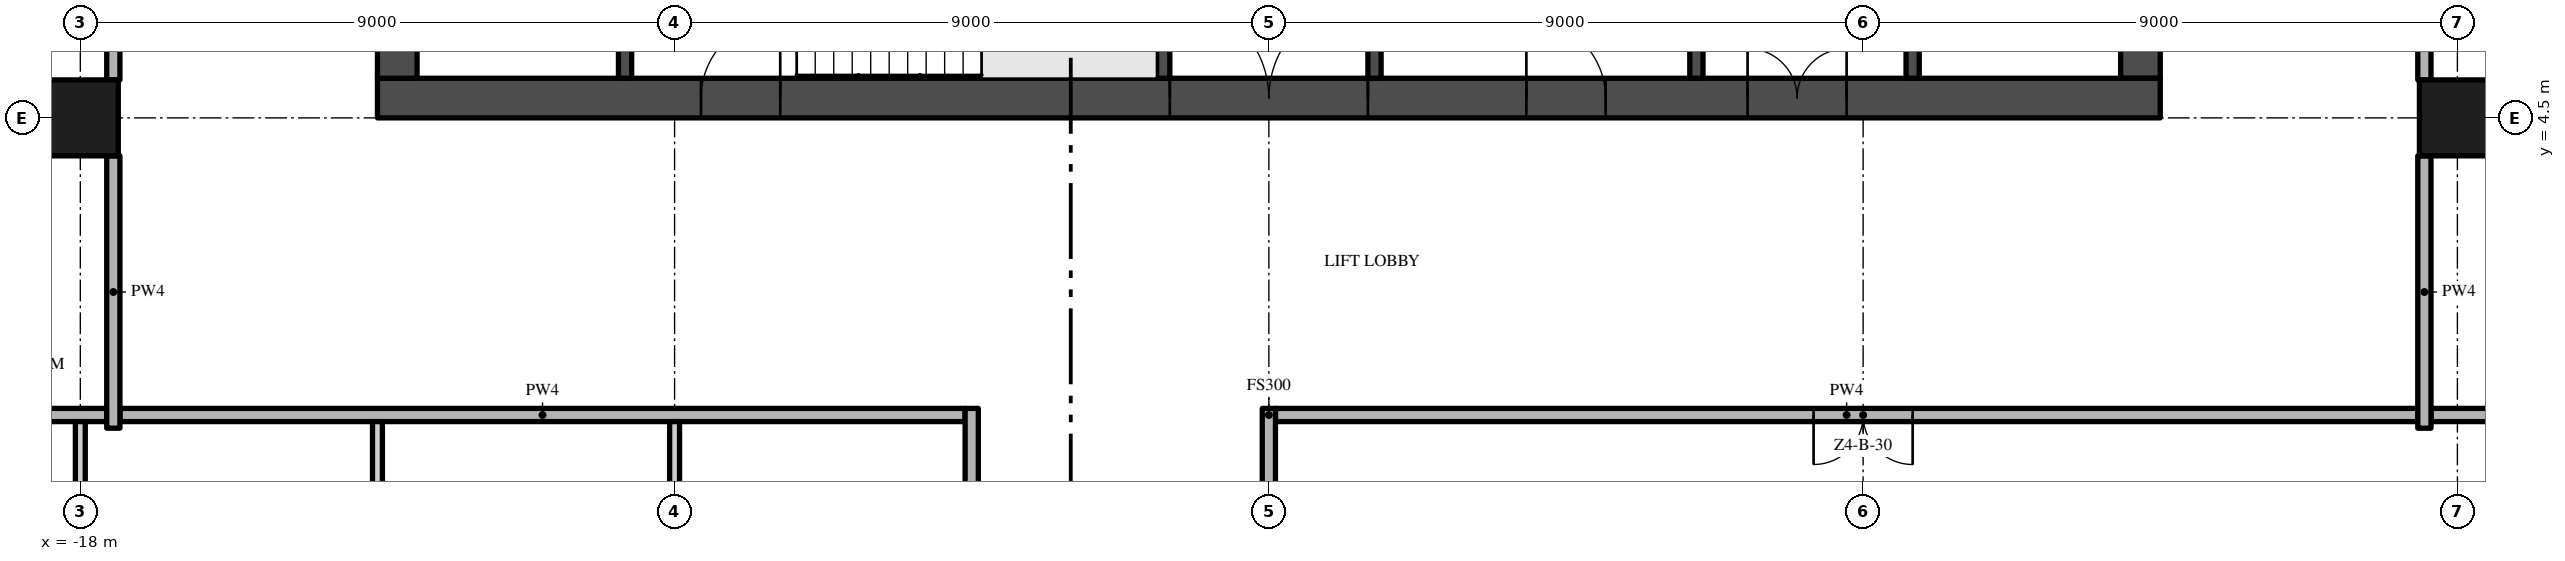
"""IFC4 building model, lengths in metres.
Left out: names, types, materials, properties, quantities, classifications, styles, units other than length and angle.
Written with IfcOpenShell. Run it as: python <this file> out.ifc"""

import sys

from ifc_helpers import new_model, si_unit, direction, frame, frame_2d, origin, origin_2d, place, context, subcontext, project, spatial, rectangle, extrude, element, fill, save


model = new_model("IFC4")
c1 = context("Model", 3, precision=1e-05, world=origin(), true_north=direction((0.0, 1.0)))
c2 = subcontext(c1, "Body", "Model", "MODEL_VIEW")
j1 = project(units=[si_unit("LENGTHUNIT", "METRE"), si_unit("PLANEANGLEUNIT", "RADIAN")], contexts=[c1])
p1 = place(None, origin())
s1 = spatial("IfcSite", under=j1, at=p1, CompositionType="ELEMENT")
p2 = place(p1, origin())
s2 = spatial("IfcBuilding", under=s1, at=p2, CompositionType="ELEMENT")
p3 = place(p2, frame((0.0, 0.0, 195.8)))
s3 = spatial("IfcBuildingStorey", under=s2, at=p3, CompositionType="ELEMENT", Elevation=195.8)
p4 = place(p3, frame((-13.5, 4.8, -0.3), z_axis=(0.0, 0.0, 1.0), x_axis=(1.0, 0.0, 0.0)))
e1 = element("IfcWall", 1, at=p4, inside=s3, PredefinedType="SHEAR", context=c2, shape_type="SweptSolid", body=[
    extrude(rectangle(XDim=27.0, YDim=0.6, at=frame_2d((13.5, 0.0))), origin(), (0.0, 0.0, 1.0), 3.8),
])
p5 = place(p4, frame((12.0, 0.0, 0.3)))
e2 = element("IfcOpeningElement", 2, at=p5, cuts=e1, PredefinedType="OPENING", context=c2, shape_type="SweptSolid", body=[
    extrude(rectangle(XDim=3.0, YDim=2.4, at=frame_2d((1.5, 1.2))), frame((0.0, 0.31, 0.0), z_axis=(0.0, -1.0, 0.0), x_axis=(1.0, 0.0, 0.0)), (0.0, 0.0, 1.0), 0.62),
])
p6 = place(p4, frame((4.9, 0.0, 0.3)))
e3 = element("IfcOpeningElement", 3, at=p6, cuts=e1, PredefinedType="OPENING", context=c2, shape_type="SweptSolid", body=[
    extrude(rectangle(XDim=1.2, YDim=2.2, at=frame_2d((0.6, 1.1))), frame((0.0, 0.31, 0.0), z_axis=(0.0, -1.0, 0.0), x_axis=(1.0, 0.0, 0.0)), (0.0, 0.0, 1.0), 0.62),
])
p7 = place(p4, frame((20.75, 0.0, 0.3)))
e4 = element("IfcOpeningElement", 4, at=p7, cuts=e1, PredefinedType="OPENING", context=c2, shape_type="SweptSolid", body=[
    extrude(rectangle(XDim=1.5, YDim=2.2, at=frame_2d((0.75, 1.1))), frame((0.0, 0.31, 0.0), z_axis=(0.0, -1.0, 0.0), x_axis=(1.0, 0.0, 0.0)), (0.0, 0.0, 1.0), 0.62),
])
p8 = place(p4, frame((17.4, 0.0, 0.3)))
e5 = element("IfcOpeningElement", 5, at=p8, cuts=e1, PredefinedType="OPENING", context=c2, shape_type="SweptSolid", body=[
    extrude(rectangle(XDim=1.2, YDim=2.2, at=frame_2d((0.6, 1.1))), frame((0.0, 0.31, 0.0), z_axis=(0.0, -1.0, 0.0), x_axis=(1.0, 0.0, 0.0)), (0.0, 0.0, 1.0), 0.62),
])
p9 = place(p3, frame((13.2, 5.1, -0.3), z_axis=(0.0, 0.0, 1.0), x_axis=(0.0, 1.0, 0.0)))
e6 = element("IfcWall", 6, at=p9, inside=s3, PredefinedType="SHEAR", context=c2, shape_type="SweptSolid", body=[
    extrude(rectangle(XDim=16.8, YDim=0.6, at=frame_2d((8.4, 0.0))), origin(), (0.0, 0.0, 1.0), 3.8),
])
p10 = place(p9, frame((6.3, 0.0, 0.3)))
e7 = element("IfcOpeningElement", 7, at=p10, cuts=e6, PredefinedType="OPENING", context=c2, shape_type="SweptSolid", body=[
    extrude(rectangle(XDim=1.2, YDim=2.2, at=frame_2d((0.6, 1.1))), frame((0.0, 0.31, 0.0), z_axis=(0.0, -1.0, 0.0), x_axis=(1.0, 0.0, 0.0)), (0.0, 0.0, 1.0), 0.62),
])
p11 = place(p3, frame((-13.2, 21.9, -0.3), z_axis=(0.0, 0.0, 1.0), x_axis=(0.0, -1.0, 0.0)))
e8 = element("IfcWall", 8, at=p11, inside=s3, PredefinedType="SHEAR", context=c2, shape_type="SweptSolid", body=[
    extrude(rectangle(XDim=16.8, YDim=0.6, at=frame_2d((8.4, 0.0))), origin(), (0.0, 0.0, 1.0), 3.8),
])
p12 = place(p11, frame((9.3, 0.0, 0.3)))
e9 = element("IfcOpeningElement", 9, at=p12, cuts=e8, PredefinedType="OPENING", context=c2, shape_type="SweptSolid", body=[
    extrude(rectangle(XDim=1.2, YDim=2.2, at=frame_2d((0.6, 1.1))), frame((0.0, 0.31, 0.0), z_axis=(0.0, -1.0, 0.0), x_axis=(1.0, 0.0, 0.0)), (0.0, 0.0, 1.0), 0.62),
])
for number, where, z_axis, x_axis in (
    (10, (-18.0, 4.5, 0.0), (0.0, 0.0, 1.0), (1.0, 0.0, 0.0)),
    (11, (18.0, 4.5, 0.0), (0.0, 0.0, 1.0), (1.0, 0.0, 0.0)),
):
    element("IfcColumn", number, at=place(p3, frame(where, z_axis=z_axis, x_axis=x_axis)), inside=s3, PredefinedType="COLUMN", context=c2, shape_type="SweptSolid", body=[
        extrude(rectangle(XDim=1.15, YDim=1.15, at=origin_2d()), origin(), (0.0, 0.0, 1.0), 3.5),
    ])
for number, where, z_axis, x_axis in (
    (12, (-9.75, 5.1, 0.0), (0.0, 0.0, 1.0), (0.0, 1.0, 0.0)),
    (13, (-1.6, 5.1, 0.0), (0.0, 0.0, 1.0), (0.0, 1.0, 0.0)),
):
    element("IfcWall", number, at=place(p3, frame(where, z_axis=z_axis, x_axis=x_axis)), inside=s3, PredefinedType="SHEAR", context=c2, shape_type="SweptSolid", body=[
        extrude(rectangle(XDim=2.85, YDim=0.2, at=frame_2d((1.425, 0.0))), origin(), (0.0, 0.0, 1.0), 3.5),
    ])
p13 = place(p3, frame((1.6, 11.5, 0.0), z_axis=(0.0, 0.0, 1.0), x_axis=(0.0, -1.0, 0.0)))
e14 = element("IfcWall", 14, at=p13, inside=s3, PredefinedType="SHEAR", context=c2, shape_type="SweptSolid", body=[
    extrude(rectangle(XDim=6.4, YDim=0.2, at=frame_2d((3.2, 0.0))), origin(), (0.0, 0.0, 1.0), 3.5),
])
p14 = place(p13, frame((2.35, 0.0, 0.0)))
e15 = element("IfcOpeningElement", 15, at=p14, cuts=e14, PredefinedType="OPENING", context=c2, shape_type="SweptSolid", body=[
    extrude(rectangle(XDim=0.9, YDim=2.1, at=frame_2d((0.45, 1.05))), frame((0.0, 0.11, 0.0), z_axis=(0.0, -1.0, 0.0), x_axis=(1.0, 0.0, 0.0)), (0.0, 0.0, 1.0), 0.22),
])
p15 = place(p3, frame((6.475, 5.1, 0.0), z_axis=(0.0, 0.0, 1.0), x_axis=(0.0, 1.0, 0.0)))
e16 = element("IfcWall", 16, at=p15, inside=s3, PredefinedType="SHEAR", context=c2, shape_type="SweptSolid", body=[
    extrude(rectangle(XDim=6.4, YDim=0.2, at=frame_2d((3.2, 0.0))), origin(), (0.0, 0.0, 1.0), 3.5),
])
p16 = place(p3, frame((9.75, 5.1, 0.0), z_axis=(0.0, 0.0, 1.0), x_axis=(0.0, 1.0, 0.0)))
e17 = element("IfcWall", 17, at=p16, inside=s3, PredefinedType="SHEAR", context=c2, shape_type="SweptSolid", body=[
    extrude(rectangle(XDim=2.5, YDim=0.2, at=frame_2d((1.25, 0.0))), origin(), (0.0, 0.0, 1.0), 3.5),
])
p17 = place(p16, frame((0.85, 0.0, 0.0)))
e18 = element("IfcOpeningElement", 18, at=p17, cuts=e17, PredefinedType="OPENING", context=c2, shape_type="SweptSolid", body=[
    extrude(rectangle(XDim=1.1, YDim=2.1, at=frame_2d((0.55, 1.05))), frame((0.0, 0.11, 0.0), z_axis=(0.0, -1.0, 0.0), x_axis=(1.0, 0.0, 0.0)), (0.0, 0.0, 1.0), 0.22),
])
p18 = place(p3, frame((-17.4, 0.0, 0.0), z_axis=(0.0, 0.0, 1.0), x_axis=(1.0, 0.0, 0.0)))
e19 = element("IfcWall", 19, at=p18, inside=s3, PredefinedType="PARTITIONING", context=c2, shape_type="SweptSolid", body=[
    extrude(rectangle(XDim=12.8, YDim=0.2, at=frame_2d((6.4, 0.0))), origin(), (0.0, 0.0, 1.0), 3.5),
])
p19 = place(p3, frame((17.4, 0.0, 0.0), z_axis=(0.0, 0.0, 1.0), x_axis=(-1.0, 0.0, 0.0)))
e20 = element("IfcWall", 20, at=p19, inside=s3, PredefinedType="PARTITIONING", context=c2, shape_type="SweptSolid", body=[
    extrude(rectangle(XDim=17.3, YDim=0.2, at=frame_2d((8.65, 0.0))), origin(), (0.0, 0.0, 1.0), 3.5),
])
p20 = place(p19, frame((7.65, 0.0, 0.0)))
e21 = element("IfcOpeningElement", 21, at=p20, cuts=e20, PredefinedType="OPENING", context=c2, shape_type="SweptSolid", body=[
    extrude(rectangle(XDim=1.5, YDim=2.4, at=frame_2d((0.75, 1.2))), frame((0.0, 0.11, 0.0), z_axis=(0.0, -1.0, 0.0), x_axis=(1.0, 0.0, 0.0)), (0.0, 0.0, 1.0), 0.22),
])
for number, where, z_axis, x_axis in (
    (22, (-26.7, 0.0, 0.0), (0.0, 0.0, 1.0), (1.0, 0.0, 0.0)),
    (23, (17.6, 0.0, 0.0), (0.0, 0.0, 1.0), (1.0, 0.0, 0.0)),
):
    element("IfcWall", number, at=place(p3, frame(where, z_axis=z_axis, x_axis=x_axis)), inside=s3, PredefinedType="PARTITIONING", context=c2, shape_type="SweptSolid", body=[
        extrude(rectangle(XDim=9.1, YDim=0.2, at=frame_2d((4.55, 0.0))), origin(), (0.0, 0.0, 1.0), 3.5),
    ])
p21 = place(p3, frame((-18.0, -3.925, 0.0), z_axis=(0.0, 0.0, 1.0), x_axis=(0.0, 1.0, 0.0)))
e24 = element("IfcWall", 24, at=p21, inside=s3, PredefinedType="PARTITIONING", context=c2, shape_type="SweptSolid", body=[
    extrude(rectangle(XDim=3.825, YDim=0.15, at=frame_2d((1.913, 0.0))), origin(), (0.0, 0.0, 1.0), 3.5),
])
p22 = place(p21, frame((0.15, 0.0, 0.0)))
e25 = element("IfcOpeningElement", 25, at=p22, cuts=e24, PredefinedType="OPENING", context=c2, shape_type="SweptSolid", body=[
    extrude(rectangle(XDim=1.0, YDim=2.4, at=frame_2d((0.5, 1.2))), frame((0.0, 0.085, 0.0), z_axis=(0.0, -1.0, 0.0), x_axis=(1.0, 0.0, 0.0)), (0.0, 0.0, 1.0), 0.17),
])
p23 = place(p3, frame((-17.5, -0.2, 0.0), z_axis=(0.0, 0.0, 1.0), x_axis=(0.0, 1.0, 0.0)))
e26 = element("IfcWall", 26, at=p23, inside=s3, PredefinedType="PARTITIONING", context=c2, shape_type="SweptSolid", body=[
    extrude(rectangle(XDim=4.125, YDim=0.2, at=frame_2d((2.062, 0.0))), origin(), (0.0, 0.0, 1.0), 3.5),
])
p24 = place(p3, frame((-17.5, 5.075, 0.0), z_axis=(0.0, 0.0, 1.0), x_axis=(0.0, 1.0, 0.0)))
e27 = element("IfcWall", 27, at=p24, inside=s3, PredefinedType="PARTITIONING", context=c2, shape_type="SweptSolid", body=[
    extrude(rectangle(XDim=7.85, YDim=0.2, at=frame_2d((3.925, 0.0))), origin(), (0.0, 0.0, 1.0), 3.5),
])
p25 = place(p24, frame((3.325, 0.0, 0.0)))
e28 = element("IfcOpeningElement", 28, at=p25, cuts=e27, PredefinedType="OPENING", context=c2, shape_type="SweptSolid", body=[
    extrude(rectangle(XDim=1.2, YDim=2.4, at=frame_2d((0.6, 1.2))), frame((0.0, 0.11, 0.0), z_axis=(0.0, -1.0, 0.0), x_axis=(1.0, 0.0, 0.0)), (0.0, 0.0, 1.0), 0.22),
])
p26 = place(p3, frame((-13.5, -8.325, 0.0), z_axis=(0.0, 0.0, 1.0), x_axis=(0.0, 1.0, 0.0)))
e29 = element("IfcWall", 29, at=p26, inside=s3, PredefinedType="PARTITIONING", context=c2, shape_type="SweptSolid", body=[
    extrude(rectangle(XDim=8.225, YDim=0.15, at=frame_2d((4.112, 0.0))), origin(), (0.0, 0.0, 1.0), 3.5),
])
p27 = place(p3, frame((-9.0, -3.925, 0.0), z_axis=(0.0, 0.0, 1.0), x_axis=(0.0, 1.0, 0.0)))
e30 = element("IfcWall", 30, at=p27, inside=s3, PredefinedType="PARTITIONING", context=c2, shape_type="SweptSolid", body=[
    extrude(rectangle(XDim=3.825, YDim=0.15, at=frame_2d((1.913, 0.0))), origin(), (0.0, 0.0, 1.0), 3.5),
])
p28 = place(p27, frame((0.4, 0.0, 0.0)))
e31 = element("IfcOpeningElement", 31, at=p28, cuts=e30, PredefinedType="OPENING", context=c2, shape_type="SweptSolid", body=[
    extrude(rectangle(XDim=1.0, YDim=2.4, at=frame_2d((0.5, 1.2))), frame((0.0, 0.085, 0.0), z_axis=(0.0, -1.0, 0.0), x_axis=(1.0, 0.0, 0.0)), (0.0, 0.0, 1.0), 0.17),
])
p29 = place(p3, frame((-4.5, -22.2, 0.0), z_axis=(0.0, 0.0, 1.0), x_axis=(0.0, 1.0, 0.0)))
e32 = element("IfcWall", 32, at=p29, inside=s3, PredefinedType="PARTITIONING", context=c2, shape_type="SweptSolid", body=[
    extrude(rectangle(XDim=22.3, YDim=0.2, at=frame_2d((11.15, 0.0))), origin(), (0.0, 0.0, 1.0), 3.5),
])
p30 = place(p29, frame((10.2, 0.0, 0.0)))
e33 = element("IfcOpeningElement", 33, at=p30, cuts=e32, PredefinedType="OPENING", context=c2, shape_type="SweptSolid", body=[
    extrude(rectangle(XDim=1.5, YDim=2.4, at=frame_2d((0.75, 1.2))), frame((0.0, 0.11, 0.0), z_axis=(0.0, -1.0, 0.0), x_axis=(1.0, 0.0, 0.0)), (0.0, 0.0, 1.0), 0.22),
])
p31 = place(p3, frame((0.0, -3.925, 0.0), z_axis=(0.0, 0.0, 1.0), x_axis=(0.0, 1.0, 0.0)))
e34 = element("IfcWall", 34, at=p31, inside=s3, PredefinedType="PARTITIONING", context=c2, shape_type="SweptSolid", body=[
    extrude(rectangle(XDim=4.025, YDim=0.2, at=frame_2d((2.013, 0.0))), origin(), (0.0, 0.0, 1.0), 3.5),
])
p32 = place(p3, frame((17.5, -0.2, 0.0), z_axis=(0.0, 0.0, 1.0), x_axis=(0.0, 1.0, 0.0)))
e35 = element("IfcWall", 35, at=p32, inside=s3, PredefinedType="PARTITIONING", context=c2, shape_type="SweptSolid", body=[
    extrude(rectangle(XDim=4.125, YDim=0.2, at=frame_2d((2.062, 0.0))), origin(), (0.0, 0.0, 1.0), 3.5),
])
p33 = place(p3, frame((17.5, 12.925, 0.0), z_axis=(0.0, 0.0, 1.0), x_axis=(0.0, -1.0, 0.0)))
e36 = element("IfcWall", 36, at=p33, inside=s3, PredefinedType="PARTITIONING", context=c2, shape_type="SweptSolid", body=[
    extrude(rectangle(XDim=7.85, YDim=0.2, at=frame_2d((3.925, 0.0))), origin(), (0.0, 0.0, 1.0), 3.5),
])
p34 = place(p33, frame((5.6, 0.0, 0.0)))
e37 = element("IfcOpeningElement", 37, at=p34, cuts=e36, PredefinedType="OPENING", context=c2, shape_type="SweptSolid", body=[
    extrude(rectangle(XDim=1.2, YDim=2.4, at=frame_2d((0.6, 1.2))), frame((0.0, 0.11, 0.0), z_axis=(0.0, -1.0, 0.0), x_axis=(1.0, 0.0, 0.0)), (0.0, 0.0, 1.0), 0.22),
])
p35 = place(p5, frame((3.0, 0.0, 0.0), z_axis=(0.0, 0.0, 1.0), x_axis=(-1.0, 0.0, 0.0)))
e38 = element("IfcDoor", 38, at=p35, inside=s3, OperationType="DOUBLE_DOOR_SINGLE_SWING", PredefinedType="DOOR", context=c2, shape_type="SweptSolid", body=[
    extrude(rectangle(XDim=3.0, YDim=2.4, at=frame_2d((1.5, 1.2))), frame((0.0, 0.025, 0.0), z_axis=(0.0, -1.0, 0.0), x_axis=(1.0, 0.0, 0.0)), (0.0, 0.0, 1.0), 0.05),
])
fill(e2, e38)
p36 = place(p6, frame((1.2, 0.0, 0.0), z_axis=(0.0, 0.0, 1.0), x_axis=(-1.0, 0.0, 0.0)))
e39 = element("IfcDoor", 39, at=p36, inside=s3, OperationType="SINGLE_SWING_LEFT", PredefinedType="DOOR", context=c2, shape_type="SweptSolid", body=[
    extrude(rectangle(XDim=1.2, YDim=2.2, at=frame_2d((0.6, 1.1))), frame((0.0, 0.025, 0.0), z_axis=(0.0, -1.0, 0.0), x_axis=(1.0, 0.0, 0.0)), (0.0, 0.0, 1.0), 0.05),
])
fill(e3, e39)
p37 = place(p7, frame((1.5, 0.0, 0.0), z_axis=(0.0, 0.0, 1.0), x_axis=(-1.0, 0.0, 0.0)))
e40 = element("IfcDoor", 40, at=p37, inside=s3, OperationType="DOUBLE_DOOR_SINGLE_SWING", PredefinedType="DOOR", context=c2, shape_type="SweptSolid", body=[
    extrude(rectangle(XDim=1.5, YDim=2.2, at=frame_2d((0.75, 1.1))), frame((0.0, 0.025, 0.0), z_axis=(0.0, -1.0, 0.0), x_axis=(1.0, 0.0, 0.0)), (0.0, 0.0, 1.0), 0.05),
])
fill(e4, e40)
p38 = place(p8, frame((1.2, 0.0, 0.0), z_axis=(0.0, 0.0, 1.0), x_axis=(-1.0, 0.0, 0.0)))
e41 = element("IfcDoor", 41, at=p38, inside=s3, OperationType="SINGLE_SWING_RIGHT", PredefinedType="DOOR", context=c2, shape_type="SweptSolid", body=[
    extrude(rectangle(XDim=1.2, YDim=2.2, at=frame_2d((0.6, 1.1))), frame((0.0, 0.025, 0.0), z_axis=(0.0, -1.0, 0.0), x_axis=(1.0, 0.0, 0.0)), (0.0, 0.0, 1.0), 0.05),
])
fill(e5, e41)
p39 = place(p20, origin())
e42 = element("IfcDoor", 42, at=p39, inside=s3, OperationType="DOUBLE_DOOR_SINGLE_SWING", PredefinedType="DOOR", context=c2, shape_type="SweptSolid", body=[
    extrude(rectangle(XDim=1.5, YDim=2.4, at=frame_2d((0.75, 1.2))), frame((0.0, 0.025, 0.0), z_axis=(0.0, -1.0, 0.0), x_axis=(1.0, 0.0, 0.0)), (0.0, 0.0, 1.0), 0.05),
])
fill(e21, e42)
save(model, sys.argv[1])
